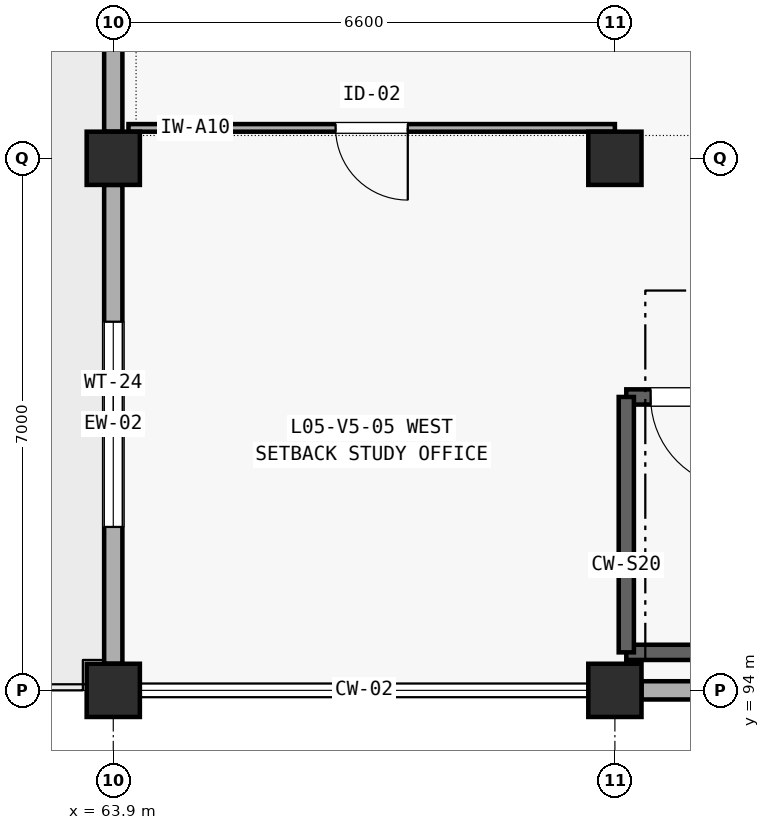
"""IFC4 building model, lengths in metres.
Left out: names, types, materials, properties, quantities, classifications, styles, units other than length and angle.
Written with IfcOpenShell. Run it as: python <this file> out.ifc"""

import sys

from ifc_helpers import new_model, si_unit, direction, frame, frame_2d, origin, origin_2d, place, context, subcontext, project, spatial, rectangle, extrude, element, fill, save


model = new_model("IFC4")
c1 = context("Model", 3, precision=1e-05, world=origin(), true_north=direction((0.0, 1.0)))
c2 = subcontext(c1, "Body", "Model", "MODEL_VIEW")
j1 = project(units=[si_unit("LENGTHUNIT", "METRE"), si_unit("PLANEANGLEUNIT", "RADIAN")], contexts=[c1])
p1 = place(None, origin())
s1 = spatial("IfcSite", under=j1, at=p1, CompositionType="ELEMENT")
p2 = place(p1, origin())
s2 = spatial("IfcBuilding", under=s1, at=p2, CompositionType="ELEMENT")
p3 = place(p2, frame((0.0, 0.0, 21.0)))
s3 = spatial("IfcBuildingStorey", under=s2, at=p3, CompositionType="ELEMENT", Elevation=21.0)
for number, where, z_axis, x_axis in (
    (1, (63.9, 94.0, 0.0), (0.0, 0.0, 1.0), (1.0, 0.0, 0.0)),
    (2, (63.9, 101.0, 0.0), (0.0, 0.0, 1.0), (1.0, 0.0, 0.0)),
    (3, (70.5, 94.0, 0.0), (0.0, 0.0, 1.0), (1.0, 0.0, 0.0)),
    (4, (70.5, 101.0, 0.0), (0.0, 0.0, 1.0), (1.0, 0.0, 0.0)),
):
    element("IfcColumn", number, at=place(p3, frame(where, z_axis=z_axis, x_axis=x_axis)), inside=s3, PredefinedType="COLUMN", context=c2, shape_type="SweptSolid", body=[
        extrude(rectangle(XDim=0.7, YDim=0.7, at=origin_2d()), origin(), (0.0, 0.0, 1.0), 4.2),
    ])
p4 = place(p3, frame((70.85, 94.0, 0.0), z_axis=(0.0, 0.0, 1.0), x_axis=(1.0, 0.0, 0.0)))
e5 = element("IfcWall", 5, at=p4, inside=s3, PredefinedType="SOLIDWALL", context=c2, shape_type="SweptSolid", body=[
    extrude(rectangle(XDim=5.9, YDim=0.24, at=frame_2d((2.95, 0.0))), origin(), (0.0, 0.0, 1.0), 3.385),
])
p5 = place(p4, frame((2.125, 0.0, 0.85)))
e6 = element("IfcOpeningElement", 6, at=p5, cuts=e5, PredefinedType="OPENING", context=c2, shape_type="SweptSolid", body=[
    extrude(rectangle(XDim=1.65, YDim=1.35, at=frame_2d((0.825, 0.675))), frame((0.0, 0.13, 0.0), z_axis=(0.0, -1.0, 0.0), x_axis=(1.0, 0.0, 0.0)), (0.0, 0.0, 1.0), 0.26),
])
p6 = place(p3, frame((63.9, 94.35, 0.0), z_axis=(0.0, 0.0, 1.0), x_axis=(0.0, 1.0, 0.0)))
e7 = element("IfcWall", 7, at=p6, inside=s3, PredefinedType="SOLIDWALL", context=c2, shape_type="SweptSolid", body=[
    extrude(rectangle(XDim=6.3, YDim=0.24, at=frame_2d((3.15, 0.0))), origin(), (0.0, 0.0, 1.0), 3.505),
])
p7 = place(p6, frame((1.8, 0.0, 0.85)))
e8 = element("IfcOpeningElement", 8, at=p7, cuts=e7, PredefinedType="OPENING", context=c2, shape_type="SweptSolid", body=[
    extrude(rectangle(XDim=2.7, YDim=1.6, at=frame_2d((1.35, 0.8))), frame((0.0, 0.13, 0.0), z_axis=(0.0, -1.0, 0.0), x_axis=(1.0, 0.0, 0.0)), (0.0, 0.0, 1.0), 0.26),
])
p8 = place(p3, frame((63.9, 101.35, 0.0), z_axis=(0.0, 0.0, 1.0), x_axis=(0.0, 1.0, 0.0)))
e9 = element("IfcWall", 9, at=p8, inside=s3, PredefinedType="SOLIDWALL", context=c2, shape_type="SweptSolid", body=[
    extrude(rectangle(XDim=6.3, YDim=0.24, at=frame_2d((3.15, 0.0))), origin(), (0.0, 0.0, 1.0), 3.505),
])
p9 = place(p8, frame((2.45, 0.0, 0.0)))
e10 = element("IfcOpeningElement", 10, at=p9, cuts=e9, PredefinedType="OPENING", context=c2, shape_type="SweptSolid", body=[
    extrude(rectangle(XDim=1.4, YDim=2.15, at=frame_2d((0.7, 1.075))), frame((0.0, 0.13, 0.0), z_axis=(0.0, -1.0, 0.0), x_axis=(1.0, 0.0, 0.0)), (0.0, 0.0, 1.0), 0.26),
])
p10 = place(p3, frame((70.65, 94.5, 0.0), z_axis=(0.0, 0.0, 1.0), x_axis=(1.0, 0.0, 0.0)))
e11 = element("IfcWall", 11, at=p10, inside=s3, PredefinedType="SHEAR", context=c2, shape_type="SweptSolid", body=[
    extrude(rectangle(XDim=6.3, YDim=0.2, at=frame_2d((3.15, 0.0))), origin(), (0.0, 0.0, 1.0), 4.2),
])
p11 = place(p3, frame((70.65, 97.86, 0.0), z_axis=(0.0, 0.0, 1.0), x_axis=(1.0, 0.0, 0.0)))
e12 = element("IfcWall", 12, at=p11, inside=s3, PredefinedType="SHEAR", context=c2, shape_type="SweptSolid", body=[
    extrude(rectangle(XDim=6.3, YDim=0.2, at=frame_2d((3.15, 0.0))), origin(), (0.0, 0.0, 1.0), 4.2),
])
p12 = place(p11, frame((0.32, 0.0, 0.0)))
e13 = element("IfcOpeningElement", 13, at=p12, cuts=e12, PredefinedType="OPENING", context=c2, shape_type="SweptSolid", body=[
    extrude(rectangle(XDim=1.2, YDim=2.15, at=frame_2d((0.6, 1.075))), frame((0.0, 0.11, 0.0), z_axis=(0.0, -1.0, 0.0), x_axis=(1.0, 0.0, 0.0)), (0.0, 0.0, 1.0), 0.22),
])
p13 = place(p3, frame((70.65, 94.5, 0.0), z_axis=(0.0, 0.0, 1.0), x_axis=(0.0, 1.0, 0.0)))
e14 = element("IfcWall", 14, at=p13, inside=s3, PredefinedType="SHEAR", context=c2, shape_type="SweptSolid", body=[
    extrude(rectangle(XDim=3.36, YDim=0.2, at=frame_2d((1.68, 0.0))), origin(), (0.0, 0.0, 1.0), 4.2),
])
p14 = place(p3, frame((64.1, 101.4, 0.0), z_axis=(0.0, 0.0, 1.0), x_axis=(1.0, 0.0, 0.0)))
e15 = element("IfcWall", 15, at=p14, inside=s3, PredefinedType="PARTITIONING", context=c2, shape_type="SweptSolid", body=[
    extrude(rectangle(XDim=6.4, YDim=0.1, at=frame_2d((3.2, 0.0))), origin(), (0.0, 0.0, 1.0), 3.9),
])
p15 = place(p14, frame((2.725, 0.0, 0.0)))
e16 = element("IfcOpeningElement", 16, at=p15, cuts=e15, PredefinedType="OPENING", context=c2, shape_type="SweptSolid", body=[
    extrude(rectangle(XDim=0.95, YDim=2.1, at=frame_2d((0.475, 1.05))), frame((0.0, 0.06, 0.0), z_axis=(0.0, -1.0, 0.0), x_axis=(1.0, 0.0, 0.0)), (0.0, 0.0, 1.0), 0.12),
])
p16 = place(p7, origin())
e17 = element("IfcWindow", 17, at=p16, inside=s3, PartitioningType="SINGLE_PANEL", PredefinedType="WINDOW", context=c2, shape_type="SweptSolid", body=[
    extrude(rectangle(XDim=2.7, YDim=1.6, at=frame_2d((1.35, 0.8))), frame((0.0, 0.03, 0.0), z_axis=(0.0, -1.0, 0.0), x_axis=(1.0, 0.0, 0.0)), (0.0, 0.0, 1.0), 0.06),
])
fill(e8, e17)
p17 = place(p12, frame((1.2, 0.0, 0.0), z_axis=(0.0, 0.0, 1.0), x_axis=(-1.0, 0.0, 0.0)))
e18 = element("IfcDoor", 18, at=p17, inside=s3, OperationType="SINGLE_SWING_LEFT", PredefinedType="DOOR", context=c2, shape_type="SweptSolid", body=[
    extrude(rectangle(XDim=1.2, YDim=2.15, at=frame_2d((0.6, 1.075))), frame((0.0, 0.025, 0.0), z_axis=(0.0, -1.0, 0.0), x_axis=(1.0, 0.0, 0.0)), (0.0, 0.0, 1.0), 0.05),
])
fill(e13, e18)
p18 = place(p15, frame((0.95, 0.0, 0.0), z_axis=(0.0, 0.0, 1.0), x_axis=(-1.0, 0.0, 0.0)))
e19 = element("IfcDoor", 19, at=p18, inside=s3, OperationType="SINGLE_SWING_LEFT", PredefinedType="DOOR", context=c2, shape_type="SweptSolid", body=[
    extrude(rectangle(XDim=0.95, YDim=2.1, at=frame_2d((0.475, 1.05))), frame((0.0, 0.025, 0.0), z_axis=(0.0, -1.0, 0.0), x_axis=(1.0, 0.0, 0.0)), (0.0, 0.0, 1.0), 0.05),
])
fill(e16, e19)
save(model, sys.argv[1])
